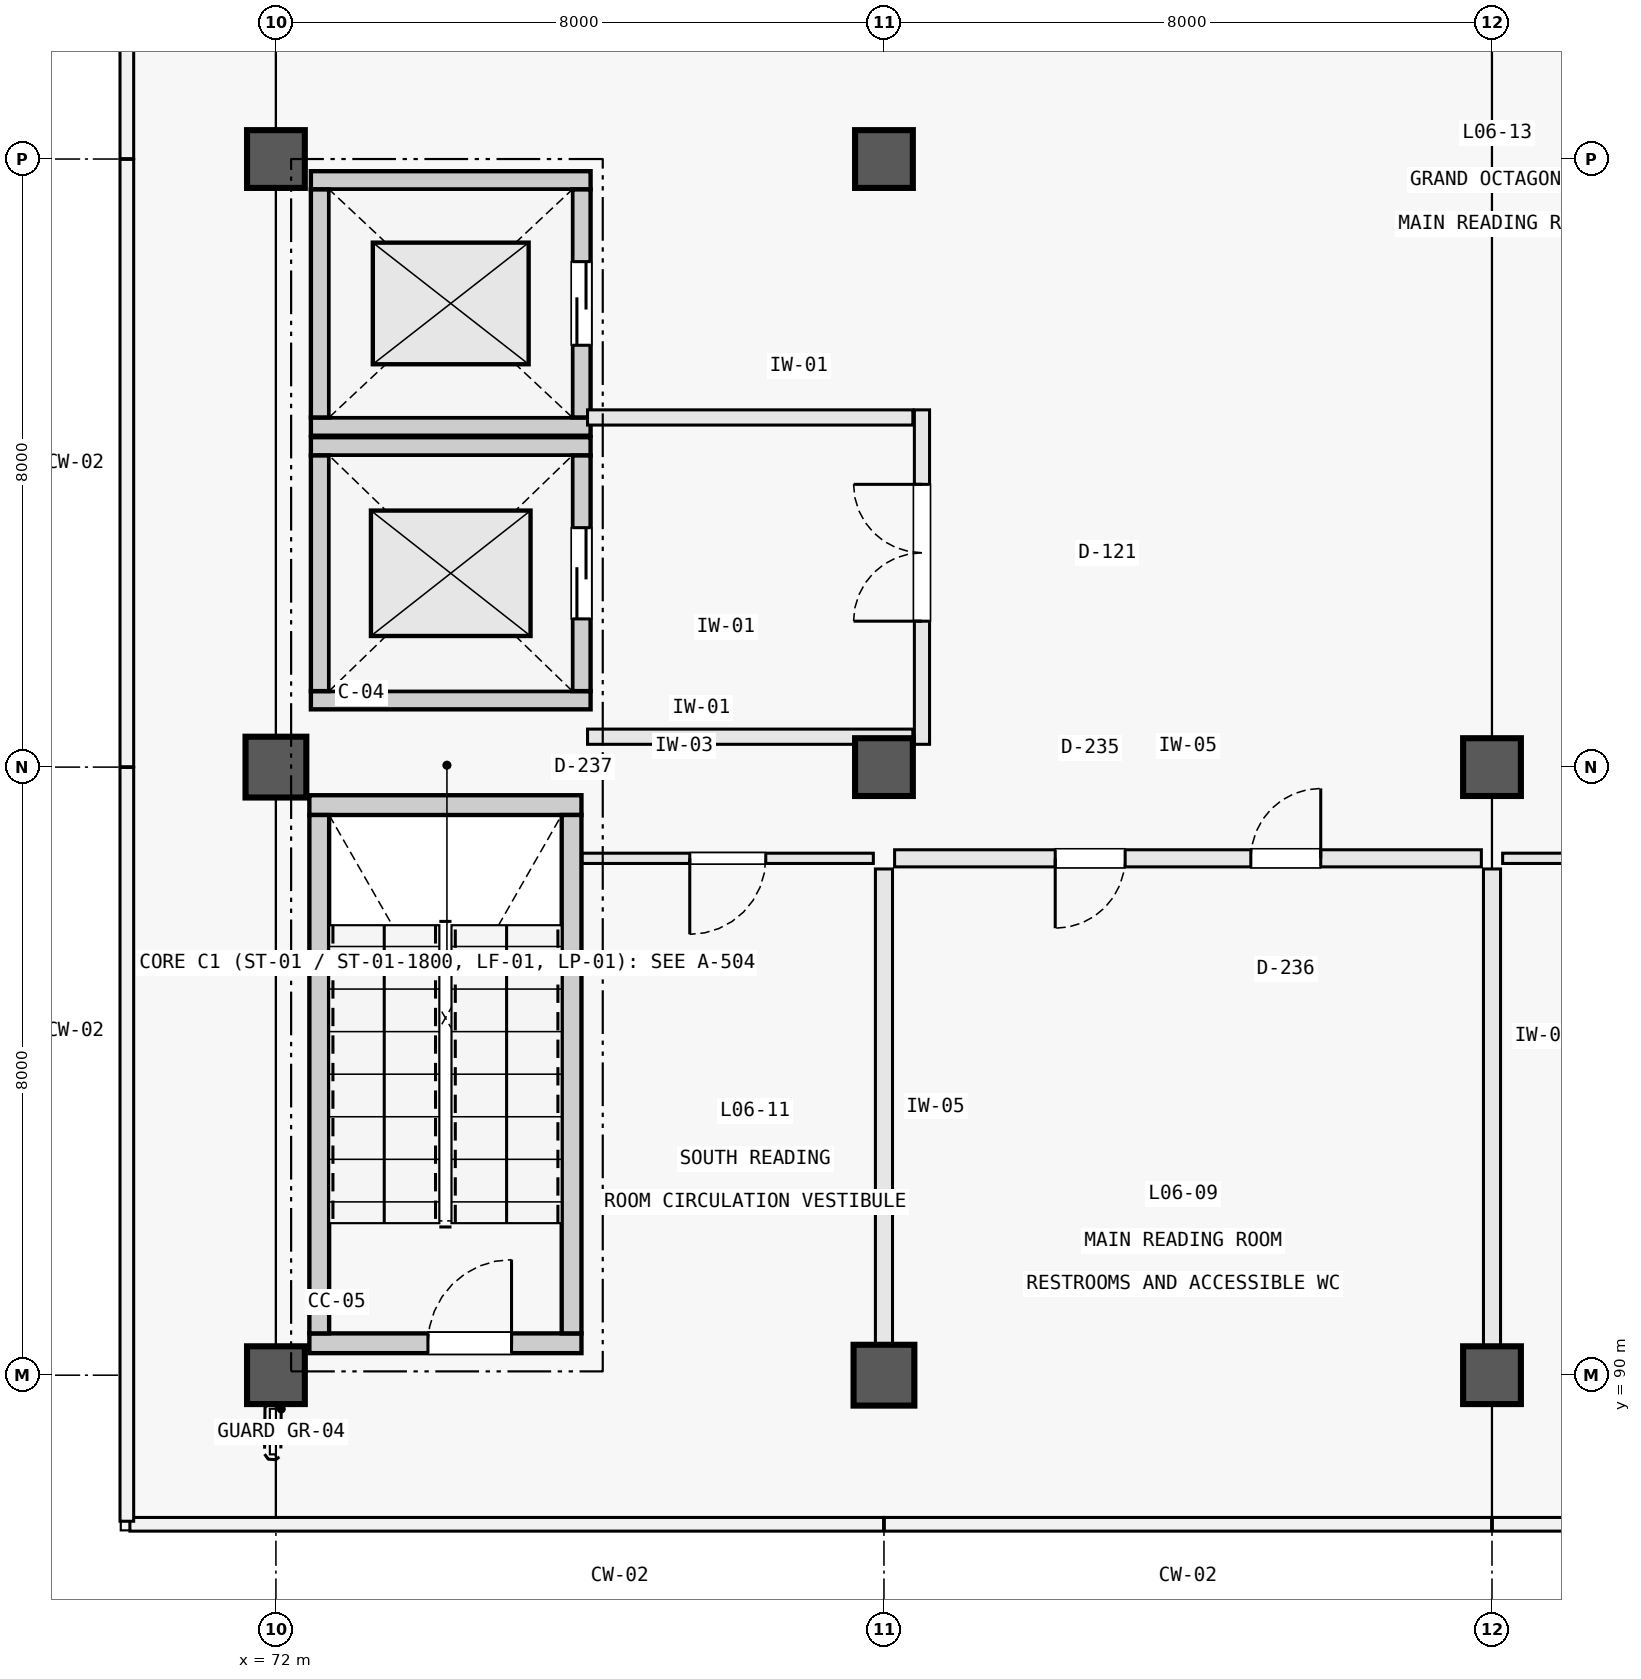
"""IFC4 building model, lengths in metres.
Left out: names, types, materials, properties, quantities, classifications, styles, units other than length and angle.
Written with IfcOpenShell. Run it as: python <this file> out.ifc"""

import sys

from ifc_helpers import new_model, si_unit, direction, frame, frame_2d, origin, origin_2d, place, context, subcontext, project, spatial, rectangle, circle, extrude, element, fill, save


model = new_model("IFC4")
c1 = context("Model", 3, precision=1e-05, world=origin(), true_north=direction((0.0, 1.0)))
c2 = subcontext(c1, "Body", "Model", "MODEL_VIEW")
j1 = project(units=[si_unit("LENGTHUNIT", "METRE"), si_unit("PLANEANGLEUNIT", "RADIAN")], contexts=[c1])
p1 = place(None, origin())
s1 = spatial("IfcSite", under=j1, at=p1, CompositionType="ELEMENT")
p2 = place(p1, origin())
s2 = spatial("IfcBuilding", under=s1, at=p2, CompositionType="ELEMENT")
p3 = place(p2, frame((0.0, 0.0, 24.9)))
s3 = spatial("IfcBuildingStorey", under=s2, at=p3, CompositionType="ELEMENT", Elevation=24.9)
p4 = place(p3, frame((72.0, 90.0, 0.0), z_axis=(0.0, 0.0, 1.0), x_axis=(1.0, 0.0, 0.0)))
e1 = element("IfcColumn", 1, at=p4, inside=s3, PredefinedType="COLUMN", context=c2, shape_type="SweptSolid", body=[
    extrude(circle(Radius=0.38, at=origin_2d()), origin(), (0.0, 0.0, 1.0), 5.4),
])
p5 = place(p3, frame((72.0, 98.0, 0.0), z_axis=(0.0, 0.0, 1.0), x_axis=(1.0, 0.0, 0.0)))
e2 = element("IfcColumn", 2, at=p5, inside=s3, PredefinedType="COLUMN", context=c2, shape_type="SweptSolid", body=[
    extrude(rectangle(XDim=0.8, YDim=0.8, at=origin_2d()), origin(), (0.0, 0.0, 1.0), 5.4),
])
p6 = place(p3, frame((72.0, 106.0, 0.0), z_axis=(0.0, 0.0, 1.0), x_axis=(1.0, 0.0, 0.0)))
e3 = element("IfcColumn", 3, at=p6, inside=s3, PredefinedType="COLUMN", context=c2, shape_type="SweptSolid", body=[
    extrude(circle(Radius=0.38, at=origin_2d()), origin(), (0.0, 0.0, 1.0), 5.4),
])
p7 = place(p3, frame((80.0, 90.0, 0.0), z_axis=(0.0, 0.0, 1.0), x_axis=(1.0, 0.0, 0.0)))
e4 = element("IfcColumn", 4, at=p7, inside=s3, PredefinedType="COLUMN", context=c2, shape_type="SweptSolid", body=[
    extrude(rectangle(XDim=0.8, YDim=0.8, at=origin_2d()), origin(), (0.0, 0.0, 1.0), 5.4),
])
for number, where, z_axis, x_axis in (
    (5, (80.0, 98.0, 0.0), (0.0, 0.0, 1.0), (1.0, 0.0, 0.0)),
    (6, (80.0, 106.0, 0.0), (0.0, 0.0, 1.0), (1.0, 0.0, 0.0)),
    (7, (88.0, 90.0, 0.0), (0.0, 0.0, 1.0), (1.0, 0.0, 0.0)),
    (8, (88.0, 98.0, 0.0), (0.0, 0.0, 1.0), (1.0, 0.0, 0.0)),
):
    element("IfcColumn", number, at=place(p3, frame(where, z_axis=z_axis, x_axis=x_axis)), inside=s3, PredefinedType="COLUMN", context=c2, shape_type="SweptSolid", body=[
        extrude(circle(Radius=0.38, at=origin_2d()), origin(), (0.0, 0.0, 1.0), 5.4),
    ])
p8 = place(p3, frame((72.44, 90.42, 0.0), z_axis=(0.0, 0.0, 1.0), x_axis=(1.0, 0.0, 0.0)))
e9 = element("IfcWall", 9, at=p8, inside=s3, PredefinedType="SOLIDWALL", context=c2, shape_type="SweptSolid", body=[
    extrude(rectangle(XDim=3.58, YDim=0.26, at=frame_2d((1.79, 0.0))), origin(), (0.0, 0.0, 1.0), 5.4),
])
p9 = place(p8, frame((1.56, 0.0, 0.0)))
e10 = element("IfcOpeningElement", 10, at=p9, cuts=e9, PredefinedType="OPENING", context=c2, shape_type="SweptSolid", body=[
    extrude(rectangle(XDim=1.1, YDim=2.2, at=frame_2d((0.55, 1.1))), frame((0.0, 0.142, 0.0), z_axis=(0.0, -1.0, 0.0), x_axis=(1.0, 0.0, 0.0)), (0.0, 0.0, 1.0), 0.284),
])
p10 = place(p3, frame((72.44, 97.5, 0.0), z_axis=(0.0, 0.0, 1.0), x_axis=(1.0, 0.0, 0.0)))
e11 = element("IfcWall", 11, at=p10, inside=s3, PredefinedType="SOLIDWALL", context=c2, shape_type="SweptSolid", body=[
    extrude(rectangle(XDim=3.58, YDim=0.26, at=frame_2d((1.79, 0.0))), origin(), (0.0, 0.0, 1.0), 5.4),
])
for number, where, z_axis, x_axis in (
    (12, (72.57, 90.55, 0.0), (0.0, 0.0, 1.0), (0.0, 1.0, 0.0)),
    (13, (75.89, 90.55, 0.0), (0.0, 0.0, 1.0), (0.0, 1.0, 0.0)),
):
    element("IfcWall", number, at=place(p3, frame(where, z_axis=z_axis, x_axis=x_axis)), inside=s3, PredefinedType="SOLIDWALL", context=c2, shape_type="SweptSolid", body=[
        extrude(rectangle(XDim=6.82, YDim=0.26, at=frame_2d((3.41, 0.0))), origin(), (0.0, 0.0, 1.0), 5.4),
    ])
for number, where, z_axis, x_axis in (
    (14, (72.46, 98.88, 0.0), (0.0, 0.0, 1.0), (1.0, 0.0, 0.0)),
    (15, (72.46, 102.22, 0.0), (0.0, 0.0, 1.0), (1.0, 0.0, 0.0)),
):
    element("IfcWall", number, at=place(p3, frame(where, z_axis=z_axis, x_axis=x_axis)), inside=s3, PredefinedType="SOLIDWALL", context=c2, shape_type="SweptSolid", body=[
        extrude(rectangle(XDim=3.68, YDim=0.24, at=frame_2d((1.84, 0.0))), origin(), (0.0, 0.0, 1.0), 5.4),
    ])
p11 = place(p3, frame((72.58, 99.0, 0.0), z_axis=(0.0, 0.0, 1.0), x_axis=(0.0, 1.0, 0.0)))
e16 = element("IfcWall", 16, at=p11, inside=s3, PredefinedType="SOLIDWALL", context=c2, shape_type="SweptSolid", body=[
    extrude(rectangle(XDim=3.1, YDim=0.24, at=frame_2d((1.55, 0.0))), origin(), (0.0, 0.0, 1.0), 5.4),
])
p12 = place(p3, frame((76.02, 99.0, 0.0), z_axis=(0.0, 0.0, 1.0), x_axis=(0.0, 1.0, 0.0)))
e17 = element("IfcWall", 17, at=p12, inside=s3, PredefinedType="SOLIDWALL", context=c2, shape_type="SweptSolid", body=[
    extrude(rectangle(XDim=3.1, YDim=0.24, at=frame_2d((1.55, 0.0))), origin(), (0.0, 0.0, 1.0), 5.4),
])
p13 = place(p12, frame((0.95, 0.0, 0.0)))
e18 = element("IfcOpeningElement", 18, at=p13, cuts=e17, PredefinedType="OPENING", context=c2, shape_type="SweptSolid", body=[
    extrude(rectangle(XDim=1.2, YDim=2.2, at=frame_2d((0.6, 1.1))), frame((0.0, 0.132, 0.0), z_axis=(0.0, -1.0, 0.0), x_axis=(1.0, 0.0, 0.0)), (0.0, 0.0, 1.0), 0.264),
])
for number, where, z_axis, x_axis in (
    (19, (72.46, 102.48, 0.0), (0.0, 0.0, 1.0), (1.0, 0.0, 0.0)),
    (20, (72.46, 105.72, 0.0), (0.0, 0.0, 1.0), (1.0, 0.0, 0.0)),
):
    element("IfcWall", number, at=place(p3, frame(where, z_axis=z_axis, x_axis=x_axis)), inside=s3, PredefinedType="SOLIDWALL", context=c2, shape_type="SweptSolid", body=[
        extrude(rectangle(XDim=3.68, YDim=0.24, at=frame_2d((1.84, 0.0))), origin(), (0.0, 0.0, 1.0), 5.4),
    ])
p14 = place(p3, frame((72.58, 102.6, 0.0), z_axis=(0.0, 0.0, 1.0), x_axis=(0.0, 1.0, 0.0)))
e21 = element("IfcWall", 21, at=p14, inside=s3, PredefinedType="SOLIDWALL", context=c2, shape_type="SweptSolid", body=[
    extrude(rectangle(XDim=3.0, YDim=0.24, at=frame_2d((1.5, 0.0))), origin(), (0.0, 0.0, 1.0), 5.4),
])
p15 = place(p3, frame((76.02, 102.6, 0.0), z_axis=(0.0, 0.0, 1.0), x_axis=(0.0, 1.0, 0.0)))
e22 = element("IfcWall", 22, at=p15, inside=s3, PredefinedType="SOLIDWALL", context=c2, shape_type="SweptSolid", body=[
    extrude(rectangle(XDim=3.0, YDim=0.24, at=frame_2d((1.5, 0.0))), origin(), (0.0, 0.0, 1.0), 5.4),
])
p16 = place(p15, frame((0.95, 0.0, 0.0)))
e23 = element("IfcOpeningElement", 23, at=p16, cuts=e22, PredefinedType="OPENING", context=c2, shape_type="SweptSolid", body=[
    extrude(rectangle(XDim=1.1, YDim=2.2, at=frame_2d((0.55, 1.1))), frame((0.0, 0.132, 0.0), z_axis=(0.0, -1.0, 0.0), x_axis=(1.0, 0.0, 0.0)), (0.0, 0.0, 1.0), 0.264),
])
for number, where, z_axis, x_axis in (
    (24, (76.1, 98.4, 0.0), (0.0, 0.0, 1.0), (1.0, 0.0, 0.0)),
    (25, (76.1, 102.6, 0.0), (0.0, 0.0, 1.0), (1.0, 0.0, 0.0)),
):
    element("IfcWall", number, at=place(p3, frame(where, z_axis=z_axis, x_axis=x_axis)), inside=s3, PredefinedType="PARTITIONING", context=c2, shape_type="SweptSolid", body=[
        extrude(rectangle(XDim=4.28, YDim=0.2, at=frame_2d((2.14, 0.0))), origin(), (0.0, 0.0, 1.0), 4.16),
    ])
p17 = place(p3, frame((80.5, 98.3, 0.0), z_axis=(0.0, 0.0, 1.0), x_axis=(0.0, 1.0, 0.0)))
e26 = element("IfcWall", 26, at=p17, inside=s3, PredefinedType="PARTITIONING", context=c2, shape_type="SweptSolid", body=[
    extrude(rectangle(XDim=4.4, YDim=0.2, at=frame_2d((2.2, 0.0))), origin(), (0.0, 0.0, 1.0), 4.16),
])
p18 = place(p17, frame((1.62, 0.0, 0.0)))
e27 = element("IfcOpeningElement", 27, at=p18, cuts=e26, PredefinedType="OPENING", context=c2, shape_type="SweptSolid", body=[
    extrude(rectangle(XDim=1.8, YDim=2.25, at=frame_2d((0.9, 1.125))), frame((0.0, 0.112, 0.0), z_axis=(0.0, -1.0, 0.0), x_axis=(1.0, 0.0, 0.0)), (0.0, 0.0, 1.0), 0.224),
])
p19 = place(p3, frame((80.0, 90.41, 0.0), z_axis=(0.0, 0.0, 1.0), x_axis=(0.0, 1.0, 0.0)))
e28 = element("IfcWall", 28, at=p19, inside=s3, PredefinedType="PARTITIONING", context=c2, shape_type="SweptSolid", body=[
    extrude(rectangle(XDim=6.25, YDim=0.225, at=frame_2d((3.125, 0.0))), origin(), (0.0, 0.0, 1.0), 3.99),
])
p20 = place(p3, frame((88.0, 90.39, 0.0), z_axis=(0.0, 0.0, 1.0), x_axis=(0.0, 1.0, 0.0)))
e29 = element("IfcWall", 29, at=p20, inside=s3, PredefinedType="PARTITIONING", context=c2, shape_type="SweptSolid", body=[
    extrude(rectangle(XDim=6.27, YDim=0.225, at=frame_2d((3.135, 0.0))), origin(), (0.0, 0.0, 1.0), 3.99),
])
p21 = place(p3, frame((80.14, 96.8, 0.0), z_axis=(0.0, 0.0, 1.0), x_axis=(1.0, 0.0, 0.0)))
e30 = element("IfcWall", 30, at=p21, inside=s3, PredefinedType="PARTITIONING", context=c2, shape_type="SweptSolid", body=[
    extrude(rectangle(XDim=7.72, YDim=0.225, at=frame_2d((3.86, 0.0))), origin(), (0.0, 0.0, 1.0), 3.99),
])
p22 = place(p21, frame((2.113, 0.0, 0.0)))
e31 = element("IfcOpeningElement", 31, at=p22, cuts=e30, PredefinedType="OPENING", context=c2, shape_type="SweptSolid", body=[
    extrude(rectangle(XDim=0.92, YDim=2.1, at=frame_2d((0.46, 1.05))), frame((0.0, 0.125, 0.0), z_axis=(0.0, -1.0, 0.0), x_axis=(1.0, 0.0, 0.0)), (0.0, 0.0, 1.0), 0.249),
])
p23 = place(p21, frame((4.687, 0.0, 0.0)))
e32 = element("IfcOpeningElement", 32, at=p23, cuts=e30, PredefinedType="OPENING", context=c2, shape_type="SweptSolid", body=[
    extrude(rectangle(XDim=0.92, YDim=2.1, at=frame_2d((0.46, 1.05))), frame((0.0, 0.125, 0.0), z_axis=(0.0, -1.0, 0.0), x_axis=(1.0, 0.0, 0.0)), (0.0, 0.0, 1.0), 0.249),
])
p24 = place(p3, frame((76.03, 96.8, 0.0), z_axis=(0.0, 0.0, 1.0), x_axis=(1.0, 0.0, 0.0)))
e33 = element("IfcWall", 33, at=p24, inside=s3, PredefinedType="PARTITIONING", context=c2, shape_type="SweptSolid", body=[
    extrude(rectangle(XDim=3.83, YDim=0.135, at=frame_2d((1.915, 0.0))), origin(), (0.0, 0.0, 1.0), 3.99),
])
p25 = place(p24, frame((1.415, 0.0, 0.0)))
e34 = element("IfcOpeningElement", 34, at=p25, cuts=e33, PredefinedType="OPENING", context=c2, shape_type="SweptSolid", body=[
    extrude(rectangle(XDim=1.0, YDim=2.15, at=frame_2d((0.5, 1.075))), frame((0.0, 0.08, 0.0), z_axis=(0.0, -1.0, 0.0), x_axis=(1.0, 0.0, 0.0)), (0.0, 0.0, 1.0), 0.159),
])
p26 = place(p3, frame((88.14, 96.8, 0.0), z_axis=(0.0, 0.0, 1.0), x_axis=(1.0, 0.0, 0.0)))
e35 = element("IfcWall", 35, at=p26, inside=s3, PredefinedType="PARTITIONING", context=c2, shape_type="SweptSolid", body=[
    extrude(rectangle(XDim=7.86, YDim=0.135, at=frame_2d((3.93, 0.0))), origin(), (0.0, 0.0, 1.0), 3.99),
])
p27 = place(p26, frame((3.13, 0.0, 0.0)))
e36 = element("IfcOpeningElement", 36, at=p27, cuts=e35, PredefinedType="OPENING", context=c2, shape_type="SweptSolid", body=[
    extrude(rectangle(XDim=1.6, YDim=2.2, at=frame_2d((0.8, 1.1))), frame((0.0, 0.08, 0.0), z_axis=(0.0, -1.0, 0.0), x_axis=(1.0, 0.0, 0.0)), (0.0, 0.0, 1.0), 0.159),
])
p28 = place(p9, origin())
e37 = element("IfcDoor", 37, at=p28, inside=s3, OperationType="SINGLE_SWING_RIGHT", PredefinedType="DOOR", context=c2, shape_type="SweptSolid", body=[
    extrude(rectangle(XDim=1.1, YDim=2.2, at=frame_2d((0.55, 1.1))), frame((0.0, 0.025, 0.0), z_axis=(0.0, -1.0, 0.0), x_axis=(1.0, 0.0, 0.0)), (0.0, 0.0, 1.0), 0.05),
])
fill(e10, e37)
p29 = place(p13, origin())
e38 = element("IfcDoor", 38, at=p29, inside=s3, OperationType="DOUBLE_DOOR_SLIDING", PredefinedType="DOOR", context=c2, shape_type="SweptSolid", body=[
    extrude(rectangle(XDim=1.2, YDim=2.2, at=frame_2d((0.6, 1.1))), frame((0.0, 0.025, 0.0), z_axis=(0.0, -1.0, 0.0), x_axis=(1.0, 0.0, 0.0)), (0.0, 0.0, 1.0), 0.05),
])
fill(e18, e38)
p30 = place(p16, origin())
e39 = element("IfcDoor", 39, at=p30, inside=s3, OperationType="DOUBLE_DOOR_SLIDING", PredefinedType="DOOR", context=c2, shape_type="SweptSolid", body=[
    extrude(rectangle(XDim=1.1, YDim=2.2, at=frame_2d((0.55, 1.1))), frame((0.0, 0.025, 0.0), z_axis=(0.0, -1.0, 0.0), x_axis=(1.0, 0.0, 0.0)), (0.0, 0.0, 1.0), 0.05),
])
fill(e23, e39)
p31 = place(p18, origin())
e40 = element("IfcDoor", 40, at=p31, inside=s3, OperationType="DOUBLE_DOOR_SINGLE_SWING", PredefinedType="DOOR", context=c2, shape_type="SweptSolid", body=[
    extrude(rectangle(XDim=1.8, YDim=2.25, at=frame_2d((0.9, 1.125))), frame((0.0, 0.025, 0.0), z_axis=(0.0, -1.0, 0.0), x_axis=(1.0, 0.0, 0.0)), (0.0, 0.0, 1.0), 0.05),
])
fill(e27, e40)
p32 = place(p22, frame((0.92, 0.0, 0.0), z_axis=(0.0, 0.0, 1.0), x_axis=(-1.0, 0.0, 0.0)))
e41 = element("IfcDoor", 41, at=p32, inside=s3, OperationType="SINGLE_SWING_LEFT", PredefinedType="DOOR", context=c2, shape_type="SweptSolid", body=[
    extrude(rectangle(XDim=0.92, YDim=2.1, at=frame_2d((0.46, 1.05))), frame((0.0, 0.025, 0.0), z_axis=(0.0, -1.0, 0.0), x_axis=(1.0, 0.0, 0.0)), (0.0, 0.0, 1.0), 0.05),
])
fill(e31, e41)
p33 = place(p23, origin())
e42 = element("IfcDoor", 42, at=p33, inside=s3, OperationType="SINGLE_SWING_RIGHT", PredefinedType="DOOR", context=c2, shape_type="SweptSolid", body=[
    extrude(rectangle(XDim=0.92, YDim=2.1, at=frame_2d((0.46, 1.05))), frame((0.0, 0.025, 0.0), z_axis=(0.0, -1.0, 0.0), x_axis=(1.0, 0.0, 0.0)), (0.0, 0.0, 1.0), 0.05),
])
fill(e32, e42)
p34 = place(p25, frame((1.0, 0.0, 0.0), z_axis=(0.0, 0.0, 1.0), x_axis=(-1.0, 0.0, 0.0)))
e43 = element("IfcDoor", 43, at=p34, inside=s3, OperationType="SINGLE_SWING_LEFT", PredefinedType="DOOR", context=c2, shape_type="SweptSolid", body=[
    extrude(rectangle(XDim=1.0, YDim=2.15, at=frame_2d((0.5, 1.075))), frame((0.0, 0.025, 0.0), z_axis=(0.0, -1.0, 0.0), x_axis=(1.0, 0.0, 0.0)), (0.0, 0.0, 1.0), 0.05),
])
fill(e34, e43)
save(model, sys.argv[1])
